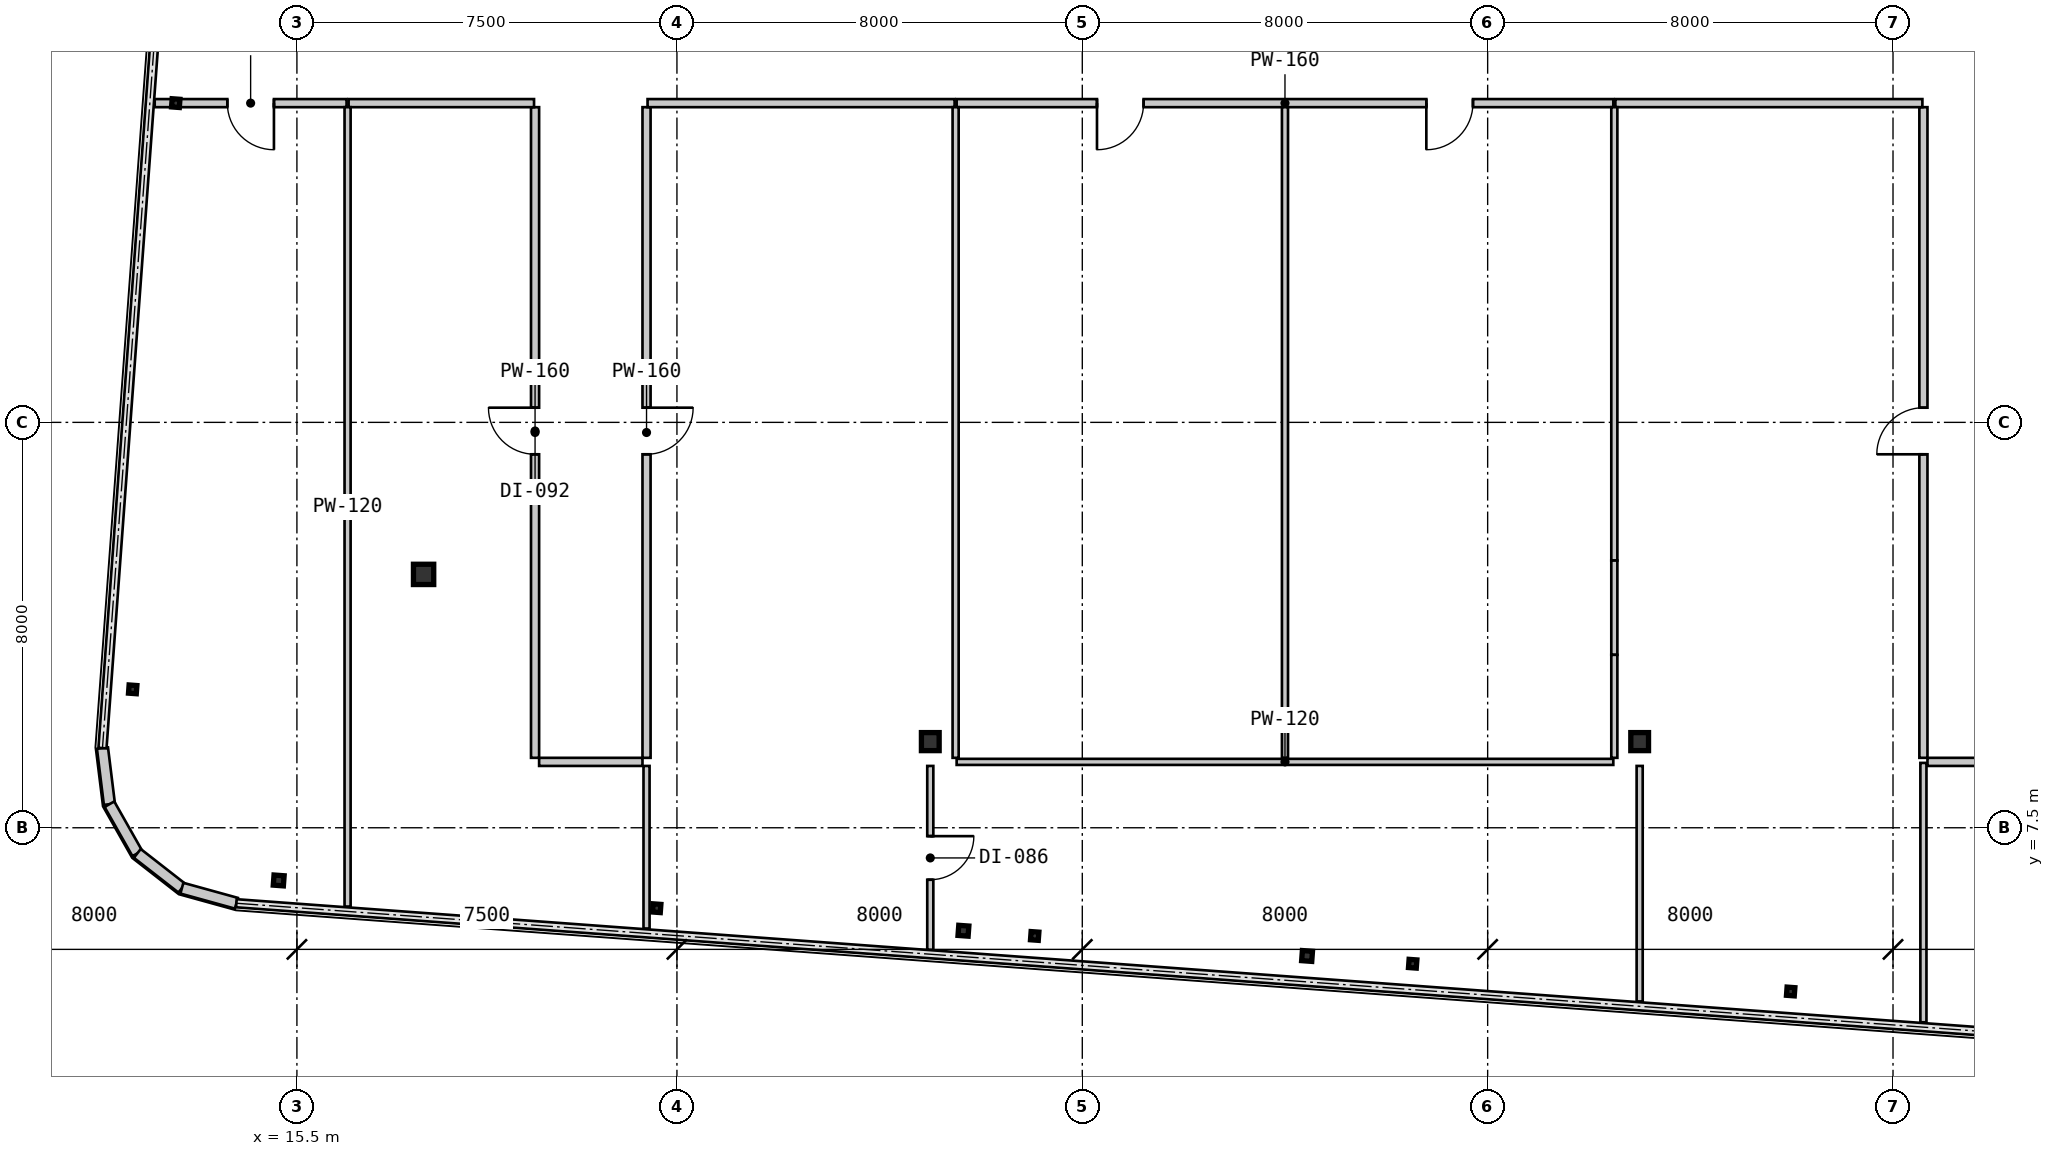
"""IFC4 building model, lengths in metres.
Left out: names, types, materials, properties, quantities, classifications, styles, units other than length and angle.
Written with IfcOpenShell. Run it as: python <this file> out.ifc"""

import sys

from ifc_helpers import new_model, si_unit, direction, frame, frame_2d, origin, origin_2d, place, context, subcontext, project, spatial, rectangle, hollow_rectangle, i_section, extrude, source, transform, mapped, element, fill, save


model = new_model("IFC4")
c1 = context("Model", 3, precision=1e-05, world=origin(), true_north=direction((0.0, 1.0)))
c2 = subcontext(c1, "Body", "Model", "MODEL_VIEW")
j1 = project(units=[si_unit("LENGTHUNIT", "METRE"), si_unit("PLANEANGLEUNIT", "RADIAN")], contexts=[c1])
p1 = place(None, origin())
s1 = spatial("IfcSite", under=j1, at=p1, CompositionType="ELEMENT")
p2 = place(p1, origin())
s2 = spatial("IfcBuilding", under=s1, at=p2, CompositionType="ELEMENT")
p3 = place(p2, frame((0.0, 0.0, 214.55)))
s3 = spatial("IfcBuildingStorey", under=s2, at=p3, CompositionType="ELEMENT", Elevation=214.55)
m1 = source(origin(), c2, "Body", "SweptSolid", [
    extrude(i_section(OverallWidth=0.35, OverallDepth=0.356, WebThickness=0.018, FlangeThickness=0.028, at=origin_2d()), origin(), (0.0, 0.0, 1.0), 3.15),
])
for number, where, z_axis, x_axis in (
    (1, (28.0, 9.2, 0.0), (0.0, 0.0, 1.0), (1.0, 0.0, 0.0)),
    (2, (42.0, 9.2, 0.0), (0.0, 0.0, 1.0), (1.0, 0.0, 0.0)),
):
    element("IfcColumn", number, at=place(p3, frame(where, z_axis=z_axis, x_axis=x_axis)), inside=s3, PredefinedType="COLUMN", context=c2, shape_type="MappedRepresentation", body=[
        mapped(m1, transform((0.0, 0.0, 0.0), scale=1.0)),
    ])
m2 = source(origin(), c2, "Body", "SweptSolid", [
    extrude(hollow_rectangle(XDim=0.4, YDim=0.4, WallThickness=0.016, at=origin_2d()), origin(), (0.0, 0.0, 1.0), 3.15),
])
p4 = place(p3, frame((18.0, 12.5, 0.0), z_axis=(0.0, 0.0, 1.0), x_axis=(1.0, 0.0, 0.0)))
e3 = element("IfcColumn", 3, at=p4, inside=s3, PredefinedType="COLUMN", context=c2, shape_type="MappedRepresentation", body=[
    mapped(m2, transform((0.0, 0.0, 0.0), scale=1.0)),
])
m3 = source(origin(), c2, "Body", "SweptSolid", [
    extrude(hollow_rectangle(XDim=0.2, YDim=0.2, WallThickness=0.009, at=origin_2d()), origin(), (0.0, 0.0, 1.0), 3.15),
])
p5 = place(p3, frame((15.141, 6.46, 0.0), z_axis=(0.0, 0.0, 1.0), x_axis=(0.997314477224, -0.073238197128, 0.0)))
e4 = element("IfcColumn", 4, at=p5, inside=s3, PredefinedType="COLUMN", context=c2, shape_type="MappedRepresentation", body=[
    mapped(m3, transform((0.0, 0.0, 0.0), scale=1.0)),
])
m4 = source(origin(), c2, "Body", "SweptSolid", [
    extrude(i_section(OverallWidth=0.154, OverallDepth=0.162, WebThickness=0.008, FlangeThickness=0.011, at=origin_2d()), origin(), (0.0, 0.0, 1.0), 3.15),
])
for number, where, z_axis, x_axis in (
    (5, (22.601, 5.912, 0.0), (0.0, 0.0, 1.0), (0.997, -0.073, 0.0)),
    (6, (30.061, 5.365, 0.0), (0.0, 0.0, 1.0), (0.997, -0.073, 0.0)),
    (7, (37.521, 4.817, 0.0), (0.0, 0.0, 1.0), (0.997, -0.073, 0.0)),
    (8, (44.98, 4.269, 0.0), (0.0, 0.0, 1.0), (0.997, -0.073, 0.0)),
    (9, (12.259, 10.231, 0.0), (0.0, 0.0, 1.0), (0.997, -0.073, 0.0)),
    (10, (13.109, 21.8, 0.0), (0.0, 0.0, 1.0), (0.997, -0.073, 0.0)),
):
    element("IfcColumn", number, at=place(p3, frame(where, z_axis=z_axis, x_axis=x_axis)), inside=s3, PredefinedType="COLUMN", context=c2, shape_type="MappedRepresentation", body=[
        mapped(m4, transform((0.0, 0.0, 0.0), scale=1.0)),
    ])
for number, where, z_axis, x_axis in (
    (11, (28.654, 5.468, 0.0), (0.0, 0.0, 1.0), (0.997, -0.073, 0.0)),
    (12, (35.436, 4.97, 0.0), (0.0, 0.0, 1.0), (0.997, -0.073, 0.0)),
):
    element("IfcColumn", number, at=place(p3, frame(where, z_axis=z_axis, x_axis=x_axis)), inside=s3, PredefinedType="COLUMN", context=c2, shape_type="MappedRepresentation", body=[
        mapped(m3, transform((0.0, 0.0, 0.0), scale=1.0)),
    ])
m5 = source(origin(), c2, "Body", "SweptSolid", [
    extrude(rectangle(XDim=1.116, YDim=0.22, at=frame_2d((0.558, 0.0))), origin(), (0.0, 0.0, 1.0), 2.93),
])
for number, where, z_axis, x_axis in (
    (13, (11.663, 9.072, 0.0), (0.0, 0.0, 1.0), (0.123, -0.992, 0.0)),
    (14, (11.8, 7.965, 0.0), (0.0, 0.0, 1.0), (0.493, -0.87, 0.0)),
    (15, (12.35, 6.994, 0.0), (0.0, 0.0, 1.0), (0.789, -0.615, 0.0)),
):
    element("IfcWall", number, at=place(p3, frame(where, z_axis=z_axis, x_axis=x_axis)), inside=s3, PredefinedType="SOLIDWALL", context=c2, shape_type="MappedRepresentation", body=[
        mapped(m5, transform((0.0, 0.0, 0.0), scale=1.0)),
    ])
m6 = source(origin(), c2, "Body", "SweptSolid", [
    extrude(rectangle(XDim=1.116, YDim=0.22, at=frame_2d((0.558, 0.0))), origin(), (0.0, 0.0, 1.0), 2.93),
])
p6 = place(p3, frame((13.23, 6.307, 0.0), z_axis=(0.0, 0.0, 1.0), x_axis=(0.963890028874, -0.266300605026, 0.0)))
e16 = element("IfcWall", 16, at=p6, inside=s3, PredefinedType="SOLIDWALL", context=c2, shape_type="MappedRepresentation", body=[
    mapped(m6, transform((0.0, 0.0, 0.0), scale=1.0)),
])
m7 = source(origin(), c2, "Body", "SweptSolid", [
    extrude(rectangle(XDim=3.786, YDim=0.16, at=frame_2d((1.893, 0.0))), origin(), (0.0, 0.0, 1.0), 2.93),
])
p7 = place(p3, frame((16.48, 21.8, 0.0), z_axis=(0.0, 0.0, 1.0), x_axis=(-1.0, 0.0, 0.0)))
e17 = element("IfcWall", 17, at=p7, inside=s3, PredefinedType="PARTITIONING", context=c2, shape_type="MappedRepresentation", body=[
    mapped(m7, transform((0.0, 0.0, 0.0), scale=1.0)),
])
m8 = source(origin(), c2, "Body", "SweptSolid", [
    extrude(rectangle(XDim=0.92, YDim=2.1, at=frame_2d((0.46, 1.05))), frame((0.0, 0.09, 0.0), z_axis=(0.0, -1.0, 0.0), x_axis=(1.0, 0.0, 0.0)), (0.0, 0.0, 1.0), 0.18),
])
p8 = place(p7, frame((1.433, 0.0, 0.0)))
e18 = element("IfcOpeningElement", 18, at=p8, cuts=e17, PredefinedType="OPENING", context=c2, shape_type="MappedRepresentation", body=[
    mapped(m8, transform((0.0, 0.0, 0.0), scale=1.0)),
])
m9 = source(origin(), c2, "Body", "SweptSolid", [
    extrude(rectangle(XDim=12.84, YDim=0.16, at=frame_2d((6.42, 0.0))), origin(), (0.0, 0.0, 1.0), 2.93),
])
p9 = place(p3, frame((20.2, 8.88, 0.0), z_axis=(0.0, 0.0, 1.0), x_axis=(0.0, 1.0, 0.0)))
e19 = element("IfcWall", 19, at=p9, inside=s3, PredefinedType="PARTITIONING", context=c2, shape_type="MappedRepresentation", body=[
    mapped(m9, transform((0.0, 0.0, 0.0), scale=1.0)),
])
p10 = place(p9, frame((5.99, 0.0, 0.0)))
e20 = element("IfcOpeningElement", 20, at=p10, cuts=e19, PredefinedType="OPENING", context=c2, shape_type="MappedRepresentation", body=[
    mapped(m8, transform((0.0, 0.0, 0.0), scale=1.0)),
])
m10 = source(origin(), c2, "Body", "SweptSolid", [
    extrude(rectangle(XDim=3.659, YDim=0.16, at=frame_2d((1.83, 0.0))), origin(), (0.0, 0.0, 1.0), 2.93),
])
p11 = place(p3, frame((20.18, 21.8, 0.0), z_axis=(0.0, 0.0, 1.0), x_axis=(-1.0, 0.0, 0.0)))
e21 = element("IfcWall", 21, at=p11, inside=s3, PredefinedType="PARTITIONING", context=c2, shape_type="MappedRepresentation", body=[
    mapped(m10, transform((0.0, 0.0, 0.0), scale=1.0)),
])
m11 = source(origin(), c2, "Body", "SweptSolid", [
    extrude(rectangle(XDim=2.04, YDim=0.16, at=frame_2d((1.02, 0.0))), origin(), (0.0, 0.0, 1.0), 2.93),
])
p12 = place(p3, frame((22.32, 8.8, 0.0), z_axis=(0.0, 0.0, 1.0), x_axis=(-1.0, 0.0, 0.0)))
e22 = element("IfcWall", 22, at=p12, inside=s3, PredefinedType="PARTITIONING", context=c2, shape_type="MappedRepresentation", body=[
    mapped(m11, transform((0.0, 0.0, 0.0), scale=1.0)),
])
p13 = place(p3, frame((22.4, 21.72, 0.0), z_axis=(0.0, 0.0, 1.0), x_axis=(0.0, -1.0, 0.0)))
e23 = element("IfcWall", 23, at=p13, inside=s3, PredefinedType="PARTITIONING", context=c2, shape_type="MappedRepresentation", body=[
    mapped(m9, transform((0.0, 0.0, 0.0), scale=1.0)),
])
p14 = place(p13, frame((5.93, 0.0, 0.0)))
e24 = element("IfcOpeningElement", 24, at=p14, cuts=e23, PredefinedType="OPENING", context=c2, shape_type="MappedRepresentation", body=[
    mapped(m8, transform((0.0, 0.0, 0.0), scale=1.0)),
])
m12 = source(origin(), c2, "Body", "SweptSolid", [
    extrude(rectangle(XDim=6.06, YDim=0.16, at=frame_2d((3.03, 0.0))), origin(), (0.0, 0.0, 1.0), 2.93),
])
p15 = place(p3, frame((28.48, 21.8, 0.0), z_axis=(0.0, 0.0, 1.0), x_axis=(-1.0, 0.0, 0.0)))
e25 = element("IfcWall", 25, at=p15, inside=s3, PredefinedType="PARTITIONING", context=c2, shape_type="MappedRepresentation", body=[
    mapped(m12, transform((0.0, 0.0, 0.0), scale=1.0)),
])
m13 = source(origin(), c2, "Body", "SweptSolid", [
    extrude(rectangle(XDim=6.459, YDim=0.16, at=frame_2d((3.23, 0.0))), origin(), (0.0, 0.0, 1.0), 2.93),
])
p16 = place(p3, frame((34.98, 21.8, 0.0), z_axis=(0.0, 0.0, 1.0), x_axis=(-1.0, 0.0, 0.0)))
e26 = element("IfcWall", 26, at=p16, inside=s3, PredefinedType="PARTITIONING", context=c2, shape_type="MappedRepresentation", body=[
    mapped(m13, transform((0.0, 0.0, 0.0), scale=1.0)),
])
p17 = place(p16, frame((2.77, 0.0, 0.0)))
e27 = element("IfcOpeningElement", 27, at=p17, cuts=e26, PredefinedType="OPENING", context=c2, shape_type="MappedRepresentation", body=[
    mapped(m8, transform((0.0, 0.0, 0.0), scale=1.0)),
])
p18 = place(p3, frame((41.48, 21.8, 0.0), z_axis=(0.0, 0.0, 1.0), x_axis=(-1.0, 0.0, 0.0)))
e28 = element("IfcWall", 28, at=p18, inside=s3, PredefinedType="PARTITIONING", context=c2, shape_type="MappedRepresentation", body=[
    mapped(m13, transform((0.0, 0.0, 0.0), scale=1.0)),
])
p19 = place(p18, frame((2.77, 0.0, 0.0)))
e29 = element("IfcOpeningElement", 29, at=p19, cuts=e28, PredefinedType="OPENING", context=c2, shape_type="MappedRepresentation", body=[
    mapped(m8, transform((0.0, 0.0, 0.0), scale=1.0)),
])
p20 = place(p3, frame((47.6, 8.88, 0.0), z_axis=(0.0, 0.0, 1.0), x_axis=(0.0, 1.0, 0.0)))
e30 = element("IfcWall", 30, at=p20, inside=s3, PredefinedType="PARTITIONING", context=c2, shape_type="MappedRepresentation", body=[
    mapped(m9, transform((0.0, 0.0, 0.0), scale=1.0)),
])
p21 = place(p20, frame((5.99, 0.0, 0.0)))
e31 = element("IfcOpeningElement", 31, at=p21, cuts=e30, PredefinedType="OPENING", context=c2, shape_type="MappedRepresentation", body=[
    mapped(m8, transform((0.0, 0.0, 0.0), scale=1.0)),
])
p22 = place(p3, frame((47.58, 21.8, 0.0), z_axis=(0.0, 0.0, 1.0), x_axis=(-1.0, 0.0, 0.0)))
e32 = element("IfcWall", 32, at=p22, inside=s3, PredefinedType="PARTITIONING", context=c2, shape_type="MappedRepresentation", body=[
    mapped(m12, transform((0.0, 0.0, 0.0), scale=1.0)),
])
p23 = place(p3, frame((49.72, 8.8, 0.0), z_axis=(0.0, 0.0, 1.0), x_axis=(-1.0, 0.0, 0.0)))
e33 = element("IfcWall", 33, at=p23, inside=s3, PredefinedType="PARTITIONING", context=c2, shape_type="MappedRepresentation", body=[
    mapped(m11, transform((0.0, 0.0, 0.0), scale=1.0)),
])
m14 = source(origin(), c2, "Body", "SweptSolid", [
    extrude(rectangle(XDim=3.631, YDim=0.12, at=frame_2d((1.815, 0.0))), origin(), (0.0, 0.0, 1.0), 2.93),
])
p24 = place(p3, frame((28.0, 5.089, 0.0), z_axis=(0.0, 0.0, 1.0), x_axis=(0.0, 1.0, 0.0)))
e34 = element("IfcWall", 34, at=p24, inside=s3, PredefinedType="PARTITIONING", context=c2, shape_type="MappedRepresentation", body=[
    mapped(m14, transform((0.0, 0.0, 0.0), scale=1.0)),
])
m15 = source(origin(), c2, "Body", "SweptSolid", [
    extrude(rectangle(XDim=0.86, YDim=2.1, at=frame_2d((0.43, 1.05))), frame((0.0, 0.07, 0.0), z_axis=(0.0, -1.0, 0.0), x_axis=(1.0, 0.0, 0.0)), (0.0, 0.0, 1.0), 0.14),
])
p25 = place(p24, frame((1.385, 0.0, 0.0)))
e35 = element("IfcOpeningElement", 35, at=p25, cuts=e34, PredefinedType="OPENING", context=c2, shape_type="MappedRepresentation", body=[
    mapped(m15, transform((0.0, 0.0, 0.0), scale=1.0)),
])
m16 = source(origin(), c2, "Body", "SweptSolid", [
    extrude(rectangle(XDim=6.459, YDim=0.12, at=frame_2d((3.23, 0.0))), origin(), (0.0, 0.0, 1.0), 2.93),
])
for number, where, z_axis, x_axis in (
    (36, (28.52, 8.8, 0.0), (0.0, 0.0, 1.0), (1.0, 0.0, 0.0)),
    (37, (35.02, 8.8, 0.0), (0.0, 0.0, 1.0), (1.0, 0.0, 0.0)),
):
    element("IfcWall", number, at=place(p3, frame(where, z_axis=z_axis, x_axis=x_axis)), inside=s3, PredefinedType="PARTITIONING", context=c2, shape_type="MappedRepresentation", body=[
        mapped(m16, transform((0.0, 0.0, 0.0), scale=1.0)),
    ])
m17 = source(origin(), c2, "Body", "SweptSolid", [
    extrude(rectangle(XDim=4.647, YDim=0.12, at=frame_2d((2.324, 0.0))), origin(), (0.0, 0.0, 1.0), 2.93),
])
p26 = place(p3, frame((42.0, 8.72, 0.0), z_axis=(0.0, 0.0, 1.0), x_axis=(0.0, -1.0, 0.0)))
e38 = element("IfcWall", 38, at=p26, inside=s3, PredefinedType="PARTITIONING", context=c2, shape_type="MappedRepresentation", body=[
    mapped(m17, transform((0.0, 0.0, 0.0), scale=1.0)),
])
m18 = source(origin(), c2, "Body", "SweptSolid", [
    extrude(rectangle(XDim=15.775, YDim=0.12, at=frame_2d((7.887, 0.0))), origin(), (0.0, 0.0, 1.0), 2.93),
])
p27 = place(p3, frame((16.5, 21.72, 0.0), z_axis=(0.0, 0.0, 1.0), x_axis=(0.0, -1.0, 0.0)))
e39 = element("IfcWall", 39, at=p27, inside=s3, PredefinedType="PARTITIONING", context=c2, shape_type="MappedRepresentation", body=[
    mapped(m18, transform((0.0, 0.0, 0.0), scale=1.0)),
])
m19 = source(origin(), c2, "Body", "SweptSolid", [
    extrude(rectangle(XDim=3.208, YDim=0.12, at=frame_2d((1.604, 0.0))), origin(), (0.0, 0.0, 1.0), 2.93),
])
p28 = place(p3, frame((22.4, 8.72, 0.0), z_axis=(0.0, 0.0, 1.0), x_axis=(0.0, -1.0, 0.0)))
e40 = element("IfcWall", 40, at=p28, inside=s3, PredefinedType="PARTITIONING", context=c2, shape_type="MappedRepresentation", body=[
    mapped(m19, transform((0.0, 0.0, 0.0), scale=1.0)),
])
m20 = source(origin(), c2, "Body", "SweptSolid", [
    extrude(rectangle(XDim=12.84, YDim=0.12, at=frame_2d((6.42, 0.0))), origin(), (0.0, 0.0, 1.0), 2.93),
])
for number, where, z_axis, x_axis in (
    (41, (28.5, 21.72, 0.0), (0.0, 0.0, 1.0), (0.0, -1.0, 0.0)),
    (42, (35.0, 21.72, 0.0), (0.0, 0.0, 1.0), (0.0, -1.0, 0.0)),
):
    element("IfcWall", number, at=place(p3, frame(where, z_axis=z_axis, x_axis=x_axis)), inside=s3, PredefinedType="PARTITIONING", context=c2, shape_type="MappedRepresentation", body=[
        mapped(m20, transform((0.0, 0.0, 0.0), scale=1.0)),
    ])
m21 = source(origin(), c2, "Body", "SweptSolid", [
    extrude(rectangle(XDim=8.947, YDim=0.12, at=frame_2d((4.473, 0.0))), origin(), (0.0, 0.0, 1.0), 2.93),
])
p29 = place(p3, frame((41.5, 21.72, 0.0), z_axis=(0.0, 0.0, 1.0), x_axis=(0.0, -1.0, 0.0)))
e43 = element("IfcWall", 43, at=p29, inside=s3, PredefinedType="PARTITIONING", context=c2, shape_type="MappedRepresentation", body=[
    mapped(m21, transform((0.0, 0.0, 0.0), scale=1.0)),
])
m22 = source(origin(), c2, "Body", "SweptSolid", [
    extrude(rectangle(XDim=1.861, YDim=0.12, at=frame_2d((0.93, 0.0))), origin(), (0.0, 0.0, 1.0), 2.328),
])
p30 = place(p3, frame((41.5, 12.773, 0.0), z_axis=(0.0, 0.0, 1.0), x_axis=(0.0, -1.0, 0.0)))
e44 = element("IfcWall", 44, at=p30, inside=s3, PredefinedType="PARTITIONING", context=c2, shape_type="MappedRepresentation", body=[
    mapped(m22, transform((0.0, 0.0, 0.0), scale=1.0)),
])
m23 = source(origin(), c2, "Body", "SweptSolid", [
    extrude(rectangle(XDim=2.032, YDim=0.12, at=frame_2d((1.016, 0.0))), origin(), (0.0, 0.0, 1.0), 2.93),
])
p31 = place(p3, frame((41.5, 10.912, 0.0), z_axis=(0.0, 0.0, 1.0), x_axis=(0.0, -1.0, 0.0)))
e45 = element("IfcWall", 45, at=p31, inside=s3, PredefinedType="PARTITIONING", context=c2, shape_type="MappedRepresentation", body=[
    mapped(m23, transform((0.0, 0.0, 0.0), scale=1.0)),
])
m24 = source(origin(), c2, "Body", "SweptSolid", [
    extrude(rectangle(XDim=5.118, YDim=0.12, at=frame_2d((2.559, 0.0))), origin(), (0.0, 0.0, 1.0), 2.93),
])
p32 = place(p3, frame((47.6, 8.78, 0.0), z_axis=(0.0, 0.0, 1.0), x_axis=(0.0, -1.0, 0.0)))
e46 = element("IfcWall", 46, at=p32, inside=s3, PredefinedType="PARTITIONING", context=c2, shape_type="MappedRepresentation", body=[
    mapped(m24, transform((0.0, 0.0, 0.0), scale=1.0)),
])
m25 = source(origin(), c2, "Body", "SweptSolid", [
    extrude(rectangle(XDim=0.92, YDim=2.1, at=frame_2d((0.46, 1.05))), frame((0.0, 0.025, 0.0), z_axis=(0.0, -1.0, 0.0), x_axis=(1.0, 0.0, 0.0)), (0.0, 0.0, 1.0), 0.05),
])
p33 = place(p8, origin())
e47 = element("IfcDoor", 47, at=p33, inside=s3, OperationType="SINGLE_SWING_LEFT", PredefinedType="DOOR", context=c2, shape_type="MappedRepresentation", body=[
    mapped(m25, transform((0.0, 0.0, 0.0), scale=1.0)),
])
fill(e18, e47)
p34 = place(p10, origin())
e48 = element("IfcDoor", 48, at=p34, inside=s3, OperationType="SINGLE_SWING_RIGHT", PredefinedType="DOOR", context=c2, shape_type="MappedRepresentation", body=[
    mapped(m25, transform((0.0, 0.0, 0.0), scale=1.0)),
])
fill(e20, e48)
p35 = place(p14, origin())
e49 = element("IfcDoor", 49, at=p35, inside=s3, OperationType="SINGLE_SWING_LEFT", PredefinedType="DOOR", context=c2, shape_type="MappedRepresentation", body=[
    mapped(m25, transform((0.0, 0.0, 0.0), scale=1.0)),
])
fill(e24, e49)
p36 = place(p17, origin())
e50 = element("IfcDoor", 50, at=p36, inside=s3, OperationType="SINGLE_SWING_RIGHT", PredefinedType="DOOR", context=c2, shape_type="MappedRepresentation", body=[
    mapped(m25, transform((0.0, 0.0, 0.0), scale=1.0)),
])
fill(e27, e50)
p37 = place(p19, origin())
e51 = element("IfcDoor", 51, at=p37, inside=s3, OperationType="SINGLE_SWING_RIGHT", PredefinedType="DOOR", context=c2, shape_type="MappedRepresentation", body=[
    mapped(m25, transform((0.0, 0.0, 0.0), scale=1.0)),
])
fill(e29, e51)
p38 = place(p21, origin())
e52 = element("IfcDoor", 52, at=p38, inside=s3, OperationType="SINGLE_SWING_LEFT", PredefinedType="DOOR", context=c2, shape_type="MappedRepresentation", body=[
    mapped(m25, transform((0.0, 0.0, 0.0), scale=1.0)),
])
fill(e31, e52)
m26 = source(origin(), c2, "Body", "SweptSolid", [
    extrude(rectangle(XDim=0.86, YDim=2.1, at=frame_2d((0.43, 1.05))), frame((0.0, 0.025, 0.0), z_axis=(0.0, -1.0, 0.0), x_axis=(1.0, 0.0, 0.0)), (0.0, 0.0, 1.0), 0.05),
])
p39 = place(p25, frame((0.86, 0.0, 0.0), z_axis=(0.0, 0.0, 1.0), x_axis=(-1.0, 0.0, 0.0)))
e53 = element("IfcDoor", 53, at=p39, inside=s3, OperationType="SINGLE_SWING_LEFT", PredefinedType="DOOR", context=c2, shape_type="MappedRepresentation", body=[
    mapped(m26, transform((0.0, 0.0, 0.0), scale=1.0)),
])
fill(e35, e53)
save(model, sys.argv[1])
